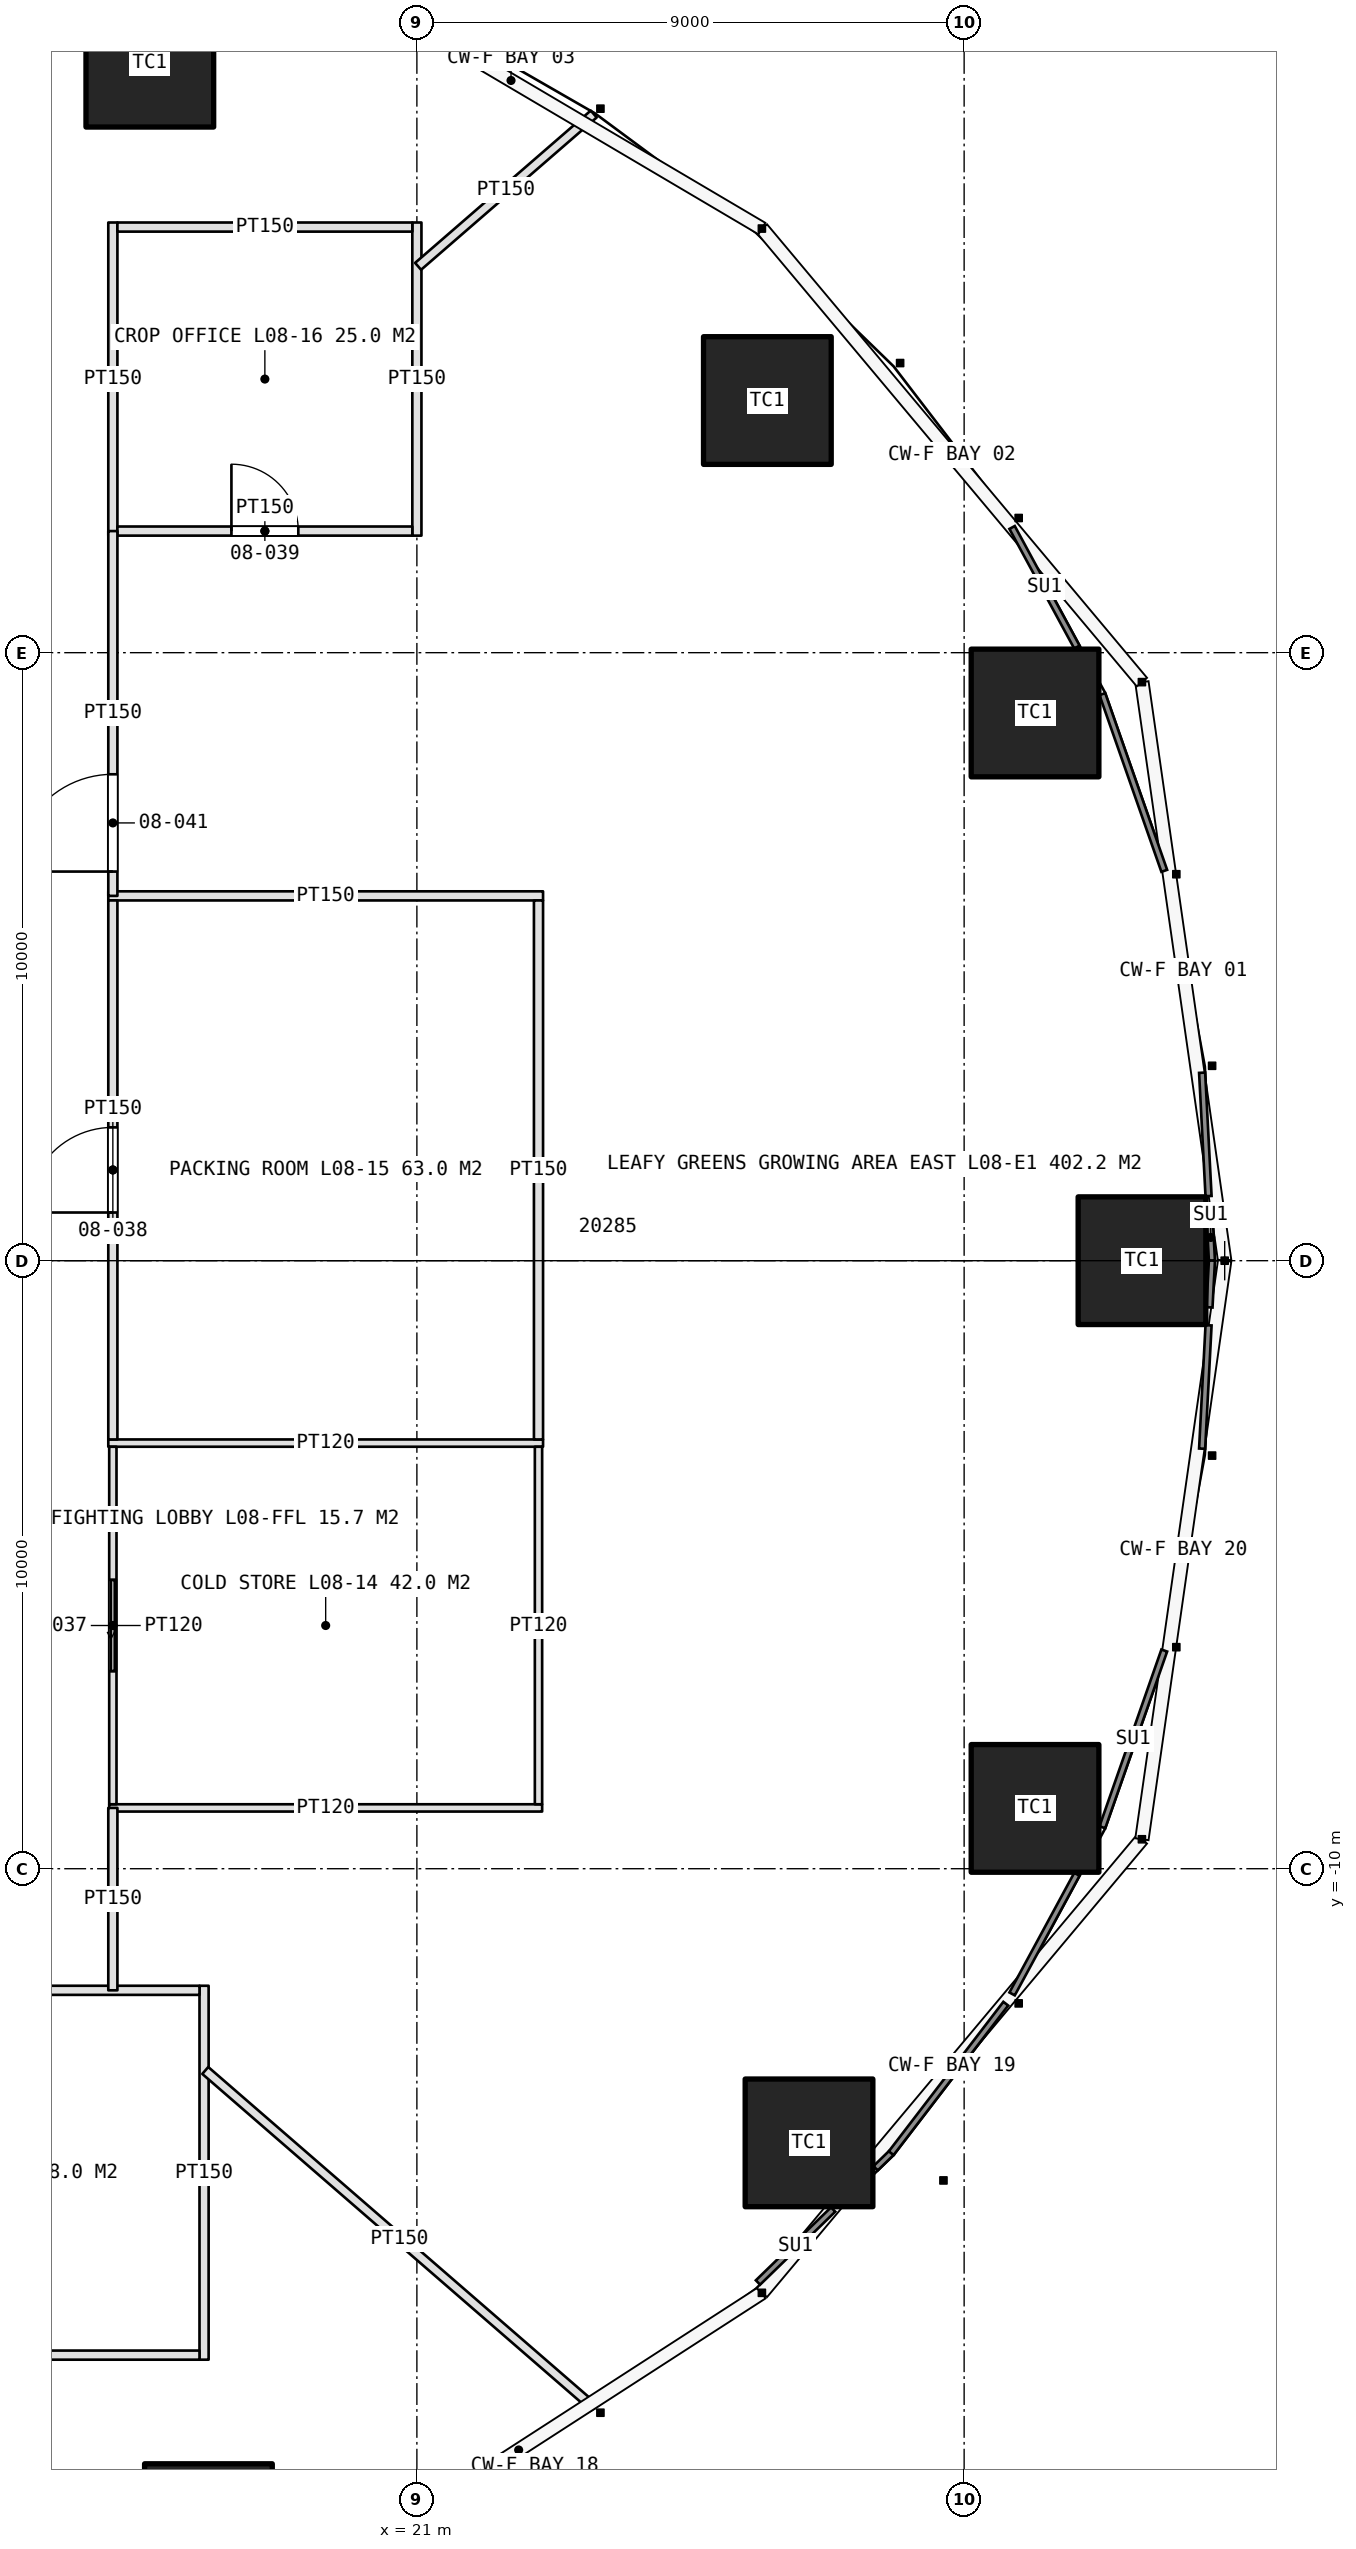
"""IFC4 building model, lengths in metres.
Left out: names, types, materials, properties, quantities, classifications, styles, units other than length and angle.
Written with IfcOpenShell. Run it as: python <this file> out.ifc"""

import sys

from ifc_helpers import new_model, si_unit, direction, frame, frame_2d, origin, origin_2d, place, context, subcontext, project, spatial, rectangle, extrude, element, fill, save


model = new_model("IFC4")
c1 = context("Model", 3, precision=1e-05, world=origin(), true_north=direction((0.0, 1.0)))
c2 = subcontext(c1, "Body", "Model", "MODEL_VIEW")
j1 = project(units=[si_unit("LENGTHUNIT", "METRE"), si_unit("PLANEANGLEUNIT", "RADIAN")], contexts=[c1])
p1 = place(None, origin())
s1 = spatial("IfcSite", under=j1, at=p1, CompositionType="ELEMENT")
p2 = place(p1, origin())
s2 = spatial("IfcBuilding", under=s1, at=p2, CompositionType="ELEMENT")
p3 = place(p2, frame((0.0, 0.0, 40.0)))
s3 = spatial("IfcBuildingStorey", under=s2, at=p3, CompositionType="ELEMENT", Elevation=40.0)
for number, where, z_axis, x_axis in (
    (1, (32.925, 0.0, 0.0), (0.0, 0.0, 1.0), (1.0, 0.0, 0.0)),
    (2, (31.166, 9.008, 0.0), (0.0, 0.0, 1.0), (1.0, 0.0, 0.0)),
    (3, (26.764, 14.147, 0.0), (0.0, 0.0, 1.0), (1.0, 0.0, 0.0)),
    (4, (16.608, 19.695, 0.0), (0.0, 0.0, 1.0), (1.0, 0.0, 0.0)),
    (5, (17.572, -20.837, 0.0), (0.0, 0.0, 1.0), (1.0, 0.0, 0.0)),
    (6, (27.449, -14.509, 0.0), (0.0, 0.0, 1.0), (1.0, 0.0, 0.0)),
    (7, (31.166, -9.008, 0.0), (0.0, 0.0, 1.0), (1.0, 0.0, 0.0)),
):
    element("IfcColumn", number, at=place(p3, frame(where, z_axis=z_axis, x_axis=x_axis)), inside=s3, PredefinedType="COLUMN", context=c2, shape_type="SweptSolid", body=[
        extrude(rectangle(XDim=2.1, YDim=2.1, at=origin_2d()), origin(), (0.0, 0.0, 1.0), 5.0),
    ])
p4 = place(p3, frame((17.5, -11.925, 0.0), z_axis=(0.0, 0.0, 1.0), x_axis=(0.0, -1.0, 0.0)))
e8 = element("IfcWall", 8, at=p4, inside=s3, PredefinedType="PARTITIONING", context=c2, shape_type="SweptSolid", body=[
    extrude(rectangle(XDim=6.15, YDim=0.15, at=frame_2d((3.075, 0.0))), origin(), (0.0, 0.0, 1.0), 3.6),
])
p5 = place(p3, frame((9.575, -12.0, 0.0), z_axis=(0.0, 0.0, 1.0), x_axis=(1.0, 0.0, 0.0)))
e9 = element("IfcWall", 9, at=p5, inside=s3, PredefinedType="PARTITIONING", context=c2, shape_type="SweptSolid", body=[
    extrude(rectangle(XDim=7.85, YDim=0.15, at=frame_2d((3.925, 0.0))), origin(), (0.0, 0.0, 1.0), 3.6),
])
p6 = place(p5, frame((3.225, 0.0, 0.0)))
e10 = element("IfcOpeningElement", 10, at=p6, cuts=e9, PredefinedType="OPENING", context=c2, shape_type="SweptSolid", body=[
    extrude(rectangle(XDim=1.4, YDim=2.4, at=frame_2d((0.7, 1.2))), frame((0.0, 0.085, 0.0), z_axis=(0.0, -1.0, 0.0), x_axis=(1.0, 0.0, 0.0)), (0.0, 0.0, 1.0), 0.17),
])
p7 = place(p3, frame((9.575, -18.0, 0.0), z_axis=(0.0, 0.0, 1.0), x_axis=(1.0, 0.0, 0.0)))
e11 = element("IfcWall", 11, at=p7, inside=s3, PredefinedType="PARTITIONING", context=c2, shape_type="SweptSolid", body=[
    extrude(rectangle(XDim=7.85, YDim=0.15, at=frame_2d((3.925, 0.0))), origin(), (0.0, 0.0, 1.0), 3.6),
])
p8 = place(p3, frame((15.94, -9.0, 0.0), z_axis=(0.0, 0.0, 1.0), x_axis=(1.0, 0.0, 0.0)))
e12 = element("IfcWall", 12, at=p8, inside=s3, PredefinedType="PARTITIONING", context=c2, shape_type="SweptSolid", body=[
    extrude(rectangle(XDim=7.12, YDim=0.12, at=frame_2d((3.56, 0.0))), origin(), (0.0, 0.0, 1.0), 3.6),
])
p9 = place(p3, frame((15.925, -3.0, 0.0), z_axis=(0.0, 0.0, 1.0), x_axis=(1.0, 0.0, 0.0)))
e13 = element("IfcWall", 13, at=p9, inside=s3, PredefinedType="PARTITIONING", context=c2, shape_type="SweptSolid", body=[
    extrude(rectangle(XDim=7.15, YDim=0.12, at=frame_2d((3.575, 0.0))), origin(), (0.0, 0.0, 1.0), 3.6),
])
p10 = place(p3, frame((15.925, 6.0, 0.0), z_axis=(0.0, 0.0, 1.0), x_axis=(1.0, 0.0, 0.0)))
e14 = element("IfcWall", 14, at=p10, inside=s3, PredefinedType="PARTITIONING", context=c2, shape_type="SweptSolid", body=[
    extrude(rectangle(XDim=7.15, YDim=0.15, at=frame_2d((3.575, 0.0))), origin(), (0.0, 0.0, 1.0), 3.6),
])
p11 = place(p3, frame((16.0, -8.94, 0.0), z_axis=(0.0, 0.0, 1.0), x_axis=(0.0, 1.0, 0.0)))
e15 = element("IfcWall", 15, at=p11, inside=s3, PredefinedType="PARTITIONING", context=c2, shape_type="SweptSolid", body=[
    extrude(rectangle(XDim=5.88, YDim=0.12, at=frame_2d((2.94, 0.0))), origin(), (0.0, 0.0, 1.0), 3.6),
])
p12 = place(p11, frame((2.19, 0.0, 0.0)))
e16 = element("IfcOpeningElement", 16, at=p12, cuts=e15, PredefinedType="OPENING", context=c2, shape_type="SweptSolid", body=[
    extrude(rectangle(XDim=1.5, YDim=2.5, at=frame_2d((0.75, 1.25))), frame((0.0, 0.07, 0.0), z_axis=(0.0, -1.0, 0.0), x_axis=(1.0, 0.0, 0.0)), (0.0, 0.0, 1.0), 0.14),
])
p13 = place(p3, frame((23.0, -8.94, 0.0), z_axis=(0.0, 0.0, 1.0), x_axis=(0.0, 1.0, 0.0)))
e17 = element("IfcWall", 17, at=p13, inside=s3, PredefinedType="PARTITIONING", context=c2, shape_type="SweptSolid", body=[
    extrude(rectangle(XDim=5.88, YDim=0.12, at=frame_2d((2.94, 0.0))), origin(), (0.0, 0.0, 1.0), 3.6),
])
p14 = place(p3, frame((16.0, -2.94, 0.0), z_axis=(0.0, 0.0, 1.0), x_axis=(0.0, 1.0, 0.0)))
e18 = element("IfcWall", 18, at=p14, inside=s3, PredefinedType="PARTITIONING", context=c2, shape_type="SweptSolid", body=[
    extrude(rectangle(XDim=8.865, YDim=0.15, at=frame_2d((4.433, 0.0))), origin(), (0.0, 0.0, 1.0), 3.6),
])
p15 = place(p14, frame((3.732, 0.0, 0.0)))
e19 = element("IfcOpeningElement", 19, at=p15, cuts=e18, PredefinedType="OPENING", context=c2, shape_type="SweptSolid", body=[
    extrude(rectangle(XDim=1.4, YDim=2.4, at=frame_2d((0.7, 1.2))), frame((0.0, 0.085, 0.0), z_axis=(0.0, -1.0, 0.0), x_axis=(1.0, 0.0, 0.0)), (0.0, 0.0, 1.0), 0.17),
])
p16 = place(p3, frame((23.0, -2.94, 0.0), z_axis=(0.0, 0.0, 1.0), x_axis=(0.0, 1.0, 0.0)))
e20 = element("IfcWall", 20, at=p16, inside=s3, PredefinedType="PARTITIONING", context=c2, shape_type="SweptSolid", body=[
    extrude(rectangle(XDim=8.865, YDim=0.15, at=frame_2d((4.433, 0.0))), origin(), (0.0, 0.0, 1.0), 3.6),
])
for number, where, z_axis, x_axis in (
    (21, (16.0, 11.925, 0.0), (0.0, 0.0, 1.0), (0.0, 1.0, 0.0)),
    (22, (21.0, 11.925, 0.0), (0.0, 0.0, 1.0), (0.0, 1.0, 0.0)),
):
    element("IfcWall", number, at=place(p3, frame(where, z_axis=z_axis, x_axis=x_axis)), inside=s3, PredefinedType="PARTITIONING", context=c2, shape_type="SweptSolid", body=[
        extrude(rectangle(XDim=5.15, YDim=0.15, at=frame_2d((2.575, 0.0))), origin(), (0.0, 0.0, 1.0), 3.6),
    ])
p17 = place(p3, frame((16.075, 12.0, 0.0), z_axis=(0.0, 0.0, 1.0), x_axis=(1.0, 0.0, 0.0)))
e23 = element("IfcWall", 23, at=p17, inside=s3, PredefinedType="PARTITIONING", context=c2, shape_type="SweptSolid", body=[
    extrude(rectangle(XDim=4.85, YDim=0.15, at=frame_2d((2.425, 0.0))), origin(), (0.0, 0.0, 1.0), 3.6),
])
p18 = place(p17, frame((1.875, 0.0, 0.0)))
e24 = element("IfcOpeningElement", 24, at=p18, cuts=e23, PredefinedType="OPENING", context=c2, shape_type="SweptSolid", body=[
    extrude(rectangle(XDim=1.1, YDim=2.3, at=frame_2d((0.55, 1.15))), frame((0.0, 0.085, 0.0), z_axis=(0.0, -1.0, 0.0), x_axis=(1.0, 0.0, 0.0)), (0.0, 0.0, 1.0), 0.17),
])
p19 = place(p3, frame((16.075, 17.0, 0.0), z_axis=(0.0, 0.0, 1.0), x_axis=(1.0, 0.0, 0.0)))
e25 = element("IfcWall", 25, at=p19, inside=s3, PredefinedType="PARTITIONING", context=c2, shape_type="SweptSolid", body=[
    extrude(rectangle(XDim=4.85, YDim=0.15, at=frame_2d((2.425, 0.0))), origin(), (0.0, 0.0, 1.0), 3.6),
])
p20 = place(p3, frame((17.52, -13.318, 0.0), z_axis=(0.0, 0.0, 1.0), x_axis=(0.755434683868, -0.655223960497, 0.0)))
e26 = element("IfcWall", 26, at=p20, inside=s3, PredefinedType="PARTITIONING", context=c2, shape_type="SweptSolid", body=[
    extrude(rectangle(XDim=8.456, YDim=0.15, at=frame_2d((4.228, 0.0))), origin(), (0.0, 0.0, 1.0), 3.6),
])
p21 = place(p3, frame((21.02, 16.354, 0.0), z_axis=(0.0, 0.0, 1.0), x_axis=(0.755425653008, 0.655234372402, 0.0)))
e27 = element("IfcWall", 27, at=p21, inside=s3, PredefinedType="PARTITIONING", context=c2, shape_type="SweptSolid", body=[
    extrude(rectangle(XDim=3.823, YDim=0.15, at=frame_2d((1.912, 0.0))), origin(), (0.0, 0.0, 1.0), 3.6),
])
p22 = place(p3, frame((16.0, -12.0, 0.0), z_axis=(0.0, 0.0, 1.0), x_axis=(0.0, 1.0, 0.0)))
e28 = element("IfcWall", 28, at=p22, inside=s3, PredefinedType="PARTITIONING", context=c2, shape_type="SweptSolid", body=[
    extrude(rectangle(XDim=3.0, YDim=0.15, at=frame_2d((1.5, 0.0))), origin(), (0.0, 0.0, 1.0), 3.6),
])
p23 = place(p3, frame((16.0, 6.0, 0.0), z_axis=(0.0, 0.0, 1.0), x_axis=(0.0, 1.0, 0.0)))
e29 = element("IfcWall", 29, at=p23, inside=s3, PredefinedType="PARTITIONING", context=c2, shape_type="SweptSolid", body=[
    extrude(rectangle(XDim=6.0, YDim=0.15, at=frame_2d((3.0, 0.0))), origin(), (0.0, 0.0, 1.0), 3.6),
])
p24 = place(p23, frame((0.4, 0.0, 0.0)))
e30 = element("IfcOpeningElement", 30, at=p24, cuts=e29, PredefinedType="OPENING", context=c2, shape_type="SweptSolid", body=[
    extrude(rectangle(XDim=1.6, YDim=2.4, at=frame_2d((0.8, 1.2))), frame((0.0, 0.085, 0.0), z_axis=(0.0, -1.0, 0.0), x_axis=(1.0, 0.0, 0.0)), (0.0, 0.0, 1.0), 0.17),
])
p25 = place(p12, origin())
e31 = element("IfcDoor", 31, at=p25, inside=s3, OperationType="SLIDING_TO_LEFT", PredefinedType="DOOR", context=c2, shape_type="SweptSolid", body=[
    extrude(rectangle(XDim=1.5, YDim=2.5, at=frame_2d((0.75, 1.25))), frame((0.0, 0.025, 0.0), z_axis=(0.0, -1.0, 0.0), x_axis=(1.0, 0.0, 0.0)), (0.0, 0.0, 1.0), 0.05),
])
fill(e16, e31)
p26 = place(p15, origin())
e32 = element("IfcDoor", 32, at=p26, inside=s3, OperationType="DOUBLE_DOOR_DOUBLE_SWING", PredefinedType="DOOR", context=c2, shape_type="SweptSolid", body=[
    extrude(rectangle(XDim=1.4, YDim=2.4, at=frame_2d((0.7, 1.2))), frame((0.0, 0.025, 0.0), z_axis=(0.0, -1.0, 0.0), x_axis=(1.0, 0.0, 0.0)), (0.0, 0.0, 1.0), 0.05),
])
fill(e19, e32)
p27 = place(p18, origin())
e33 = element("IfcDoor", 33, at=p27, inside=s3, OperationType="SINGLE_SWING_LEFT", PredefinedType="DOOR", context=c2, shape_type="SweptSolid", body=[
    extrude(rectangle(XDim=1.1, YDim=2.3, at=frame_2d((0.55, 1.15))), frame((0.0, 0.025, 0.0), z_axis=(0.0, -1.0, 0.0), x_axis=(1.0, 0.0, 0.0)), (0.0, 0.0, 1.0), 0.05),
])
fill(e24, e33)
p28 = place(p24, origin())
e34 = element("IfcDoor", 34, at=p28, inside=s3, OperationType="DOUBLE_DOOR_SINGLE_SWING", PredefinedType="DOOR", context=c2, shape_type="SweptSolid", body=[
    extrude(rectangle(XDim=1.6, YDim=2.4, at=frame_2d((0.8, 1.2))), frame((0.0, 0.025, 0.0), z_axis=(0.0, -1.0, 0.0), x_axis=(1.0, 0.0, 0.0)), (0.0, 0.0, 1.0), 0.05),
])
fill(e30, e34)
save(model, sys.argv[1])
